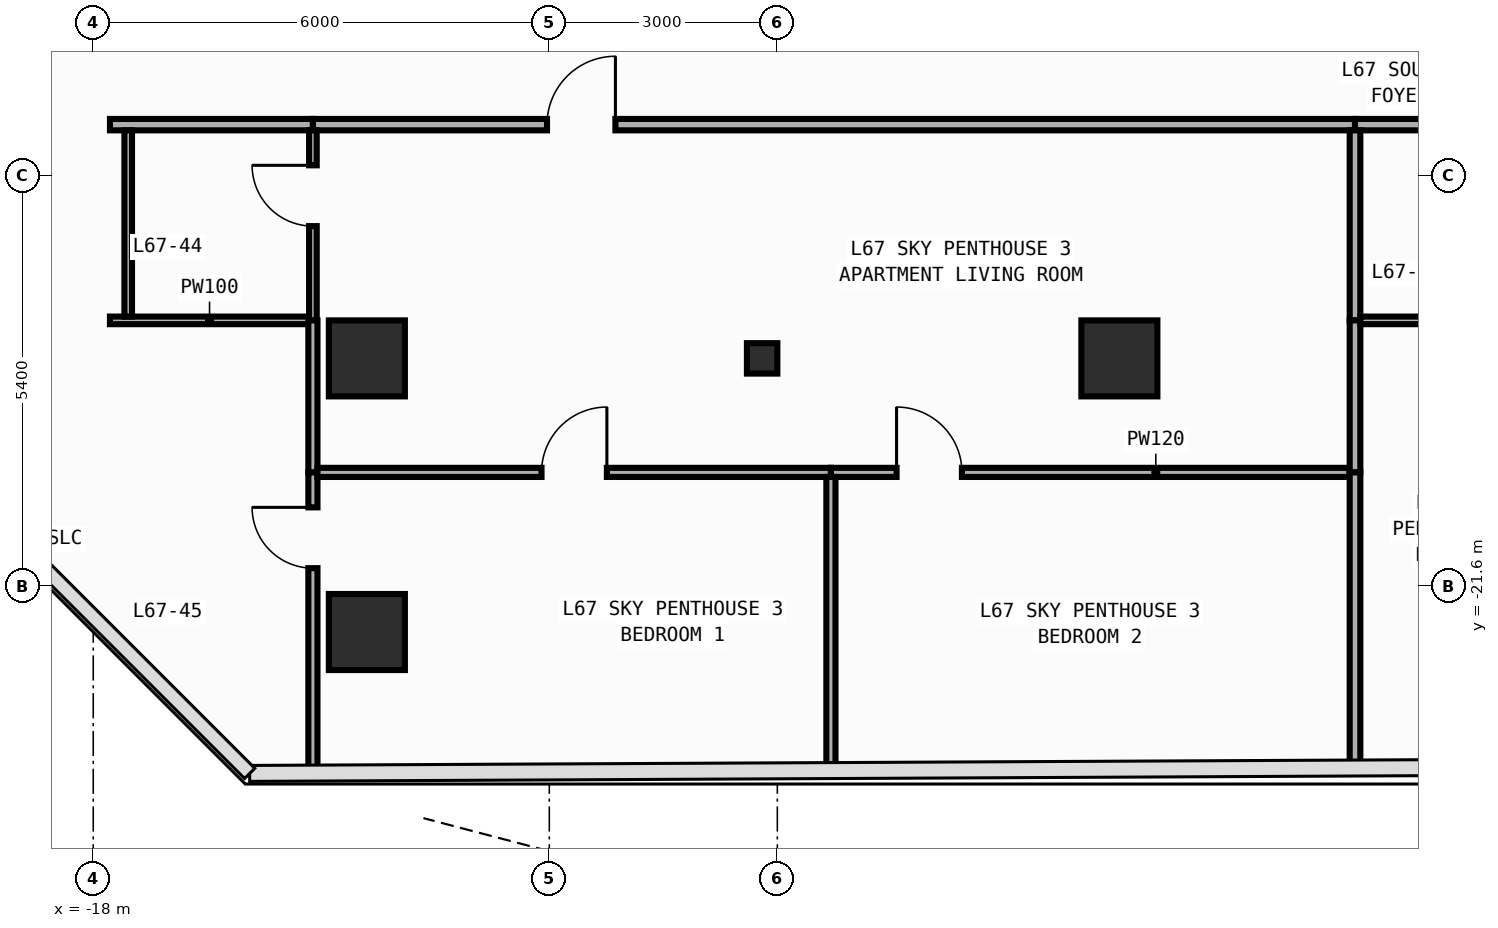
"""IFC4 building model, lengths in metres.
Left out: names, types, materials, properties, quantities, classifications, styles, units other than length and angle.
Written with IfcOpenShell. Run it as: python <this file> out.ifc"""

import sys

from ifc_helpers import new_model, si_unit, direction, frame, frame_2d, origin, origin_2d, place, context, subcontext, project, spatial, rectangle, circle, i_section, extrude, element, fill, save


model = new_model("IFC4")
c1 = context("Model", 3, precision=1e-05, world=origin(), true_north=direction((0.0, 1.0)))
c2 = subcontext(c1, "Body", "Model", "MODEL_VIEW")
j1 = project(units=[si_unit("LENGTHUNIT", "METRE"), si_unit("PLANEANGLEUNIT", "RADIAN")], contexts=[c1])
p1 = place(None, origin())
s1 = spatial("IfcSite", under=j1, at=p1, CompositionType="ELEMENT")
p2 = place(p1, origin())
s2 = spatial("IfcBuilding", under=s1, at=p2, CompositionType="ELEMENT")
p3 = place(p2, frame((0.0, 0.0, 281.4)))
s3 = spatial("IfcBuildingStorey", under=s2, at=p3, CompositionType="ELEMENT", Elevation=281.4)
p4 = place(p3, frame((-9.2, -18.6, 0.0), z_axis=(0.0, 0.0, 1.0), x_axis=(1.0, 0.0, 0.0)))
e1 = element("IfcColumn", 1, at=p4, inside=s3, PredefinedType="COLUMN", context=c2, shape_type="SweptSolid", body=[
    extrude(i_section(OverallWidth=0.4, OverallDepth=0.4, WebThickness=0.013, FlangeThickness=0.021, FilletRadius=0.022, at=origin_2d()), origin(), (0.0, 0.0, 1.0), 3.8),
])
for number, where, z_axis, x_axis in (
    (2, (-14.4, -18.6, 0.0), (0.0, 0.0, 1.0), (1.0, 0.0, 0.0)),
    (3, (-4.5, -18.6, 0.0), (0.0, 0.0, 1.0), (1.0, 0.0, 0.0)),
    (4, (-14.4, -22.2, 0.0), (0.0, 0.0, 1.0), (1.0, 0.0, 0.0)),
):
    element("IfcColumn", number, at=place(p3, frame(where, z_axis=z_axis, x_axis=x_axis)), inside=s3, PredefinedType="COLUMN", context=c2, shape_type="SweptSolid", body=[
        extrude(circle(Radius=0.5, at=origin_2d()), origin(), (0.0, 0.0, 1.0), 3.8),
    ])
p5 = place(p3, frame((-17.78, -15.525, 0.0), z_axis=(0.0, 0.0, 1.0), x_axis=(1.0, 0.0, 0.0)))
e5 = element("IfcWall", 5, at=p5, inside=s3, PredefinedType="PARTITIONING", context=c2, shape_type="SweptSolid", body=[
    extrude(rectangle(XDim=2.67, YDim=0.15, at=frame_2d((1.335, 0.0))), origin(), (0.0, 0.0, 1.0), 3.54),
])
p6 = place(p3, frame((-15.11, -15.525, 0.0), z_axis=(0.0, 0.0, 1.0), x_axis=(1.0, 0.0, 0.0)))
e6 = element("IfcWall", 6, at=p6, inside=s3, PredefinedType="PARTITIONING", context=c2, shape_type="SweptSolid", body=[
    extrude(rectangle(XDim=13.71, YDim=0.15, at=frame_2d((6.855, 0.0))), origin(), (0.0, 0.0, 1.0), 3.54),
])
p7 = place(p6, frame((3.08, 0.0, 0.0)))
e7 = element("IfcOpeningElement", 7, at=p7, cuts=e6, PredefinedType="OPENING", context=c2, shape_type="SweptSolid", body=[
    extrude(rectangle(XDim=0.9, YDim=2.15, at=frame_2d((0.45, 1.075))), frame((0.0, 0.085, 0.0), z_axis=(0.0, -1.0, 0.0), x_axis=(1.0, 0.0, 0.0)), (0.0, 0.0, 1.0), 0.17),
])
p8 = place(p3, frame((-1.4, -15.525, 0.0), z_axis=(0.0, 0.0, 1.0), x_axis=(1.0, 0.0, 0.0)))
e8 = element("IfcWall", 8, at=p8, inside=s3, PredefinedType="PARTITIONING", context=c2, shape_type="SweptSolid", body=[
    extrude(rectangle(XDim=2.59, YDim=0.15, at=frame_2d((1.295, 0.0))), origin(), (0.0, 0.0, 1.0), 3.54),
])
p9 = place(p3, frame((-17.78, -18.1, 0.0), z_axis=(0.0, 0.0, 1.0), x_axis=(1.0, 0.0, 0.0)))
e9 = element("IfcWall", 9, at=p9, inside=s3, PredefinedType="PARTITIONING", context=c2, shape_type="SweptSolid", body=[
    extrude(rectangle(XDim=2.62, YDim=0.1, at=frame_2d((1.31, 0.0))), origin(), (0.0, 0.0, 1.0), 3.54),
])
p10 = place(p3, frame((-15.11, -18.1, 0.0), z_axis=(0.0, 0.0, 1.0), x_axis=(0.0, 1.0, 0.0)))
e10 = element("IfcWall", 10, at=p10, inside=s3, PredefinedType="PARTITIONING", context=c2, shape_type="SweptSolid", body=[
    extrude(rectangle(XDim=2.5, YDim=0.1, at=frame_2d((1.25, 0.0))), origin(), (0.0, 0.0, 1.0), 3.54),
])
p11 = place(p10, frame((1.24, 0.0, 0.0)))
e11 = element("IfcOpeningElement", 11, at=p11, cuts=e10, PredefinedType="OPENING", context=c2, shape_type="SweptSolid", body=[
    extrude(rectangle(XDim=0.8, YDim=2.1, at=frame_2d((0.4, 1.05))), frame((0.0, 0.06, 0.0), z_axis=(0.0, -1.0, 0.0), x_axis=(1.0, 0.0, 0.0)), (0.0, 0.0, 1.0), 0.12),
])
p12 = place(p3, frame((-15.11, -20.1, 0.0), z_axis=(0.0, 0.0, 1.0), x_axis=(0.0, 1.0, 0.0)))
e12 = element("IfcWall", 12, at=p12, inside=s3, PredefinedType="PARTITIONING", context=c2, shape_type="SweptSolid", body=[
    extrude(rectangle(XDim=2.0, YDim=0.12, at=frame_2d((1.0, 0.0))), origin(), (0.0, 0.0, 1.0), 3.54),
])
p13 = place(p3, frame((-15.11, -24.051, 0.0), z_axis=(0.0, 0.0, 1.0), x_axis=(0.0, 1.0, 0.0)))
e13 = element("IfcWall", 13, at=p13, inside=s3, PredefinedType="PARTITIONING", context=c2, shape_type="SweptSolid", body=[
    extrude(rectangle(XDim=3.951, YDim=0.12, at=frame_2d((1.976, 0.0))), origin(), (0.0, 0.0, 1.0), 3.54),
])
p14 = place(p13, frame((2.691, 0.0, 0.0)))
e14 = element("IfcOpeningElement", 14, at=p14, cuts=e13, PredefinedType="OPENING", context=c2, shape_type="SweptSolid", body=[
    extrude(rectangle(XDim=0.8, YDim=2.1, at=frame_2d((0.4, 1.05))), frame((0.0, 0.07, 0.0), z_axis=(0.0, -1.0, 0.0), x_axis=(1.0, 0.0, 0.0)), (0.0, 0.0, 1.0), 0.14),
])
p15 = place(p3, frame((-15.05, -20.1, 0.0), z_axis=(0.0, 0.0, 1.0), x_axis=(1.0, 0.0, 0.0)))
e15 = element("IfcWall", 15, at=p15, inside=s3, PredefinedType="PARTITIONING", context=c2, shape_type="SweptSolid", body=[
    extrude(rectangle(XDim=6.755, YDim=0.12, at=frame_2d((3.377, 0.0))), origin(), (0.0, 0.0, 1.0), 3.54),
])
p16 = place(p15, frame((2.948, 0.0, 0.0)))
e16 = element("IfcOpeningElement", 16, at=p16, cuts=e15, PredefinedType="OPENING", context=c2, shape_type="SweptSolid", body=[
    extrude(rectangle(XDim=0.86, YDim=2.15, at=frame_2d((0.43, 1.075))), frame((0.0, 0.07, 0.0), z_axis=(0.0, -1.0, 0.0), x_axis=(1.0, 0.0, 0.0)), (0.0, 0.0, 1.0), 0.14),
])
p17 = place(p3, frame((-8.295, -20.1, 0.0), z_axis=(0.0, 0.0, 1.0), x_axis=(1.0, 0.0, 0.0)))
e17 = element("IfcWall", 17, at=p17, inside=s3, PredefinedType="PARTITIONING", context=c2, shape_type="SweptSolid", body=[
    extrude(rectangle(XDim=6.825, YDim=0.12, at=frame_2d((3.413, 0.0))), origin(), (0.0, 0.0, 1.0), 3.54),
])
p18 = place(p17, frame((0.864, 0.0, 0.0)))
e18 = element("IfcOpeningElement", 18, at=p18, cuts=e17, PredefinedType="OPENING", context=c2, shape_type="SweptSolid", body=[
    extrude(rectangle(XDim=0.86, YDim=2.15, at=frame_2d((0.43, 1.075))), frame((0.0, 0.07, 0.0), z_axis=(0.0, -1.0, 0.0), x_axis=(1.0, 0.0, 0.0)), (0.0, 0.0, 1.0), 0.14),
])
p19 = place(p3, frame((-1.4, -18.1, 0.0), z_axis=(0.0, 0.0, 1.0), x_axis=(0.0, 1.0, 0.0)))
e19 = element("IfcWall", 19, at=p19, inside=s3, PredefinedType="PARTITIONING", context=c2, shape_type="SweptSolid", body=[
    extrude(rectangle(XDim=2.5, YDim=0.14, at=frame_2d((1.25, 0.0))), origin(), (0.0, 0.0, 1.0), 3.54),
])
p20 = place(p3, frame((-1.4, -20.1, 0.0), z_axis=(0.0, 0.0, 1.0), x_axis=(0.0, 1.0, 0.0)))
e20 = element("IfcWall", 20, at=p20, inside=s3, PredefinedType="PARTITIONING", context=c2, shape_type="SweptSolid", body=[
    extrude(rectangle(XDim=2.0, YDim=0.14, at=frame_2d((1.0, 0.0))), origin(), (0.0, 0.0, 1.0), 3.54),
])
p21 = place(p3, frame((-8.295, -24.018, 0.0), z_axis=(0.0, 0.0, 1.0), x_axis=(0.0, 1.0, 0.0)))
e21 = element("IfcWall", 21, at=p21, inside=s3, PredefinedType="PARTITIONING", context=c2, shape_type="SweptSolid", body=[
    extrude(rectangle(XDim=3.858, YDim=0.12, at=frame_2d((1.929, 0.0))), origin(), (0.0, 0.0, 1.0), 3.54),
])
p22 = place(p3, frame((-1.4, -23.984, 0.0), z_axis=(0.0, 0.0, 1.0), x_axis=(0.0, 1.0, 0.0)))
e22 = element("IfcWall", 22, at=p22, inside=s3, PredefinedType="PARTITIONING", context=c2, shape_type="SweptSolid", body=[
    extrude(rectangle(XDim=3.884, YDim=0.14, at=frame_2d((1.942, 0.0))), origin(), (0.0, 0.0, 1.0), 3.54),
])
p23 = place(p3, frame((-1.33, -18.1, 0.0), z_axis=(0.0, 0.0, 1.0), x_axis=(1.0, 0.0, 0.0)))
e23 = element("IfcWall", 23, at=p23, inside=s3, PredefinedType="PARTITIONING", context=c2, shape_type="SweptSolid", body=[
    extrude(rectangle(XDim=2.47, YDim=0.1, at=frame_2d((1.235, 0.0))), origin(), (0.0, 0.0, 1.0), 3.54),
])
p24 = place(p3, frame((-17.54, -18.05, 0.0), z_axis=(0.0, 0.0, 1.0), x_axis=(0.0, 1.0, 0.0)))
e24 = element("IfcWall", 24, at=p24, inside=s3, PredefinedType="PARTITIONING", context=c2, shape_type="SweptSolid", body=[
    extrude(rectangle(XDim=2.45, YDim=0.1, at=frame_2d((1.225, 0.0))), origin(), (0.0, 0.0, 1.0), 3.54),
])
p25 = place(p7, origin())
e25 = element("IfcDoor", 25, at=p25, inside=s3, OperationType="SINGLE_SWING_RIGHT", PredefinedType="DOOR", context=c2, shape_type="SweptSolid", body=[
    extrude(rectangle(XDim=0.9, YDim=2.15, at=frame_2d((0.45, 1.075))), frame((0.0, 0.025, 0.0), z_axis=(0.0, -1.0, 0.0), x_axis=(1.0, 0.0, 0.0)), (0.0, 0.0, 1.0), 0.05),
])
fill(e7, e25)
p26 = place(p11, origin())
e26 = element("IfcDoor", 26, at=p26, inside=s3, OperationType="SINGLE_SWING_RIGHT", PredefinedType="DOOR", context=c2, shape_type="SweptSolid", body=[
    extrude(rectangle(XDim=0.8, YDim=2.1, at=frame_2d((0.4, 1.05))), frame((0.0, 0.025, 0.0), z_axis=(0.0, -1.0, 0.0), x_axis=(1.0, 0.0, 0.0)), (0.0, 0.0, 1.0), 0.05),
])
fill(e11, e26)
p27 = place(p16, origin())
e27 = element("IfcDoor", 27, at=p27, inside=s3, OperationType="SINGLE_SWING_RIGHT", PredefinedType="DOOR", context=c2, shape_type="SweptSolid", body=[
    extrude(rectangle(XDim=0.86, YDim=2.15, at=frame_2d((0.43, 1.075))), frame((0.0, 0.025, 0.0), z_axis=(0.0, -1.0, 0.0), x_axis=(1.0, 0.0, 0.0)), (0.0, 0.0, 1.0), 0.05),
])
fill(e16, e27)
p28 = place(p18, origin())
e28 = element("IfcDoor", 28, at=p28, inside=s3, OperationType="SINGLE_SWING_LEFT", PredefinedType="DOOR", context=c2, shape_type="SweptSolid", body=[
    extrude(rectangle(XDim=0.86, YDim=2.15, at=frame_2d((0.43, 1.075))), frame((0.0, 0.025, 0.0), z_axis=(0.0, -1.0, 0.0), x_axis=(1.0, 0.0, 0.0)), (0.0, 0.0, 1.0), 0.05),
])
fill(e18, e28)
p29 = place(p14, origin())
e29 = element("IfcDoor", 29, at=p29, inside=s3, OperationType="SINGLE_SWING_RIGHT", PredefinedType="DOOR", context=c2, shape_type="SweptSolid", body=[
    extrude(rectangle(XDim=0.8, YDim=2.1, at=frame_2d((0.4, 1.05))), frame((0.0, 0.025, 0.0), z_axis=(0.0, -1.0, 0.0), x_axis=(1.0, 0.0, 0.0)), (0.0, 0.0, 1.0), 0.05),
])
fill(e14, e29)
save(model, sys.argv[1])
